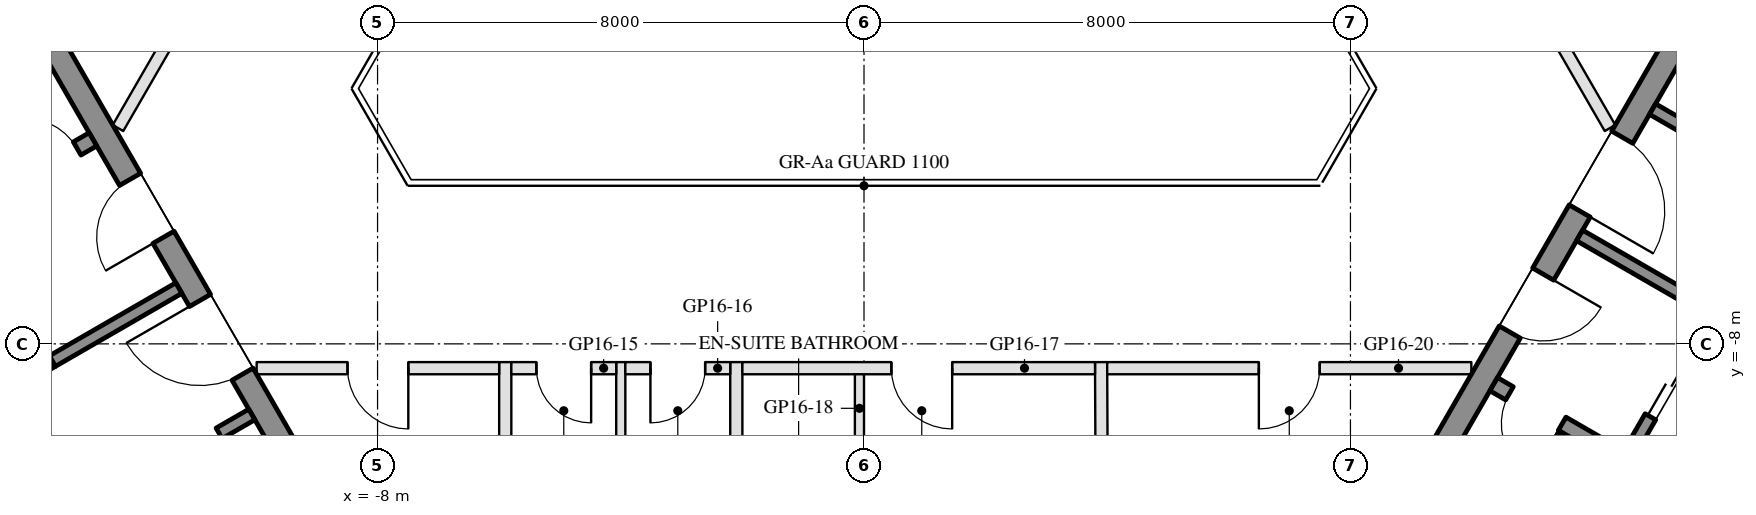
"""IFC4 building model, lengths in metres.
Left out: names, types, materials, properties, quantities, classifications, styles, units other than length and angle.
Written with IfcOpenShell. Run it as: python <this file> out.ifc"""

import sys

from ifc_helpers import new_model, si_unit, direction, frame, frame_2d, origin, place, context, subcontext, project, spatial, rectangle, extrude, element, fill, save


model = new_model("IFC4")
c1 = context("Model", 3, precision=1e-05, world=origin(), true_north=direction((0.0, 1.0)))
c2 = subcontext(c1, "Body", "Model", "MODEL_VIEW")
j1 = project(units=[si_unit("LENGTHUNIT", "METRE"), si_unit("PLANEANGLEUNIT", "RADIAN")], contexts=[c1])
p1 = place(None, origin())
s1 = spatial("IfcSite", under=j1, at=p1, CompositionType="ELEMENT")
p2 = place(p1, origin())
s2 = spatial("IfcBuilding", under=s1, at=p2, CompositionType="ELEMENT")
p3 = place(p2, frame((0.0, 0.0, 179.9)))
s3 = spatial("IfcBuildingStorey", under=s2, at=p3, CompositionType="ELEMENT", Elevation=179.9)
p4 = place(p3, frame((-13.845, -2.22, 0.0), z_axis=(0.0, 0.0, 1.0), x_axis=(0.500004234368, -0.866022959057, 0.0)))
e1 = element("IfcWall", 1, at=p4, inside=s3, PredefinedType="SHEAR", context=c2, shape_type="SweptSolid", body=[
    extrude(rectangle(XDim=10.0, YDim=0.4, at=frame_2d((5.0, 0.0))), origin(), (0.0, 0.0, 1.0), 3.5),
])
p5 = place(p4, frame((3.55, 0.0, 0.0)))
e2 = element("IfcOpeningElement", 2, at=p5, cuts=e1, PredefinedType="OPENING", context=c2, shape_type="SweptSolid", body=[
    extrude(rectangle(XDim=1.1, YDim=2.1, at=frame_2d((0.55, 1.05))), frame((0.0, 0.21, 0.0), z_axis=(0.0, -1.0, 0.0), x_axis=(1.0, 0.0, 0.0)), (0.0, 0.0, 1.0), 0.42),
])
p6 = place(p4, frame((5.85, 0.0, 0.0)))
e3 = element("IfcOpeningElement", 3, at=p6, cuts=e1, PredefinedType="OPENING", context=c2, shape_type="SweptSolid", body=[
    extrude(rectangle(XDim=1.4, YDim=2.1, at=frame_2d((0.7, 1.05))), frame((0.0, 0.21, 0.0), z_axis=(0.0, -1.0, 0.0), x_axis=(1.0, 0.0, 0.0)), (0.0, 0.0, 1.0), 0.42),
])
p7 = place(p3, frame((-12.681, -4.636, 0.0), z_axis=(0.0, 0.0, 1.0), x_axis=(-0.866021702275, -0.500006411147, 0.0)))
e4 = element("IfcWall", 4, at=p7, inside=s3, PredefinedType="SHEAR", context=c2, shape_type="SweptSolid", body=[
    extrude(rectangle(XDim=6.45, YDim=0.25, at=frame_2d((3.225, 0.0))), origin(), (0.0, 0.0, 1.0), 3.5),
])
p8 = place(p7, frame((0.3, 0.0, 0.0)))
e5 = element("IfcOpeningElement", 5, at=p8, cuts=e4, PredefinedType="OPENING", context=c2, shape_type="SweptSolid", body=[
    extrude(rectangle(XDim=1.0, YDim=2.1, at=frame_2d((0.5, 1.05))), frame((0.0, 0.135, 0.0), z_axis=(0.0, -1.0, 0.0), x_axis=(1.0, 0.0, 0.0)), (0.0, 0.0, 1.0), 0.27),
])
p9 = place(p3, frame((-14.783, -5.995, 0.0), z_axis=(0.0, 0.0, 1.0), x_axis=(0.49994636267, -0.866056369097, 0.0)))
e6 = element("IfcWall", 6, at=p9, inside=s3, PredefinedType="SHEAR", context=c2, shape_type="SweptSolid", body=[
    extrude(rectangle(XDim=2.8, YDim=0.2, at=frame_2d((1.4, 0.0))), origin(), (0.0, 0.0, 1.0), 3.5),
])
p10 = place(p9, frame((0.7, 0.0, 0.0)))
e7 = element("IfcOpeningElement", 7, at=p10, cuts=e6, PredefinedType="OPENING", context=c2, shape_type="SweptSolid", body=[
    extrude(rectangle(XDim=1.2, YDim=2.1, at=frame_2d((0.6, 1.05))), frame((0.0, 0.11, 0.0), z_axis=(0.0, -1.0, 0.0), x_axis=(1.0, 0.0, 0.0)), (0.0, 0.0, 1.0), 0.22),
])
p11 = place(p3, frame((-11.268, -7.083, 0.0), z_axis=(0.0, 0.0, 1.0), x_axis=(-0.866050077142, -0.499957262057, 0.0)))
e8 = element("IfcWall", 8, at=p11, inside=s3, PredefinedType="SHEAR", context=c2, shape_type="SweptSolid", body=[
    extrude(rectangle(XDim=2.4, YDim=0.2, at=frame_2d((1.2, 0.0))), origin(), (0.0, 0.0, 1.0), 3.5),
])
p12 = place(p3, frame((-10.068, -9.162, 0.0), z_axis=(0.0, 0.0, 1.0), x_axis=(-0.866032725843, -0.499987317609, 0.0)))
e9 = element("IfcWall", 9, at=p12, inside=s3, PredefinedType="SHEAR", context=c2, shape_type="SweptSolid", body=[
    extrude(rectangle(XDim=10.16, YDim=0.2, at=frame_2d((5.08, 0.0))), origin(), (0.0, 0.0, 1.0), 3.5),
])
p13 = place(p12, frame((0.62, 0.0, 0.0)))
e10 = element("IfcOpeningElement", 10, at=p13, cuts=e9, PredefinedType="OPENING", context=c2, shape_type="SweptSolid", body=[
    extrude(rectangle(XDim=1.1, YDim=2.1, at=frame_2d((0.55, 1.05))), frame((0.0, 0.11, 0.0), z_axis=(0.0, -1.0, 0.0), x_axis=(1.0, 0.0, 0.0)), (0.0, 0.0, 1.0), 0.22),
])
p14 = place(p12, frame((3.16, 0.0, 0.0)))
e11 = element("IfcOpeningElement", 11, at=p14, cuts=e9, PredefinedType="OPENING", context=c2, shape_type="SweptSolid", body=[
    extrude(rectangle(XDim=1.1, YDim=2.1, at=frame_2d((0.55, 1.05))), frame((0.0, 0.11, 0.0), z_axis=(0.0, -1.0, 0.0), x_axis=(1.0, 0.0, 0.0)), (0.0, 0.0, 1.0), 0.22),
])
p15 = place(p12, frame((5.7, 0.0, 0.0)))
e12 = element("IfcOpeningElement", 12, at=p15, cuts=e9, PredefinedType="OPENING", context=c2, shape_type="SweptSolid", body=[
    extrude(rectangle(XDim=1.1, YDim=2.1, at=frame_2d((0.55, 1.05))), frame((0.0, 0.11, 0.0), z_axis=(0.0, -1.0, 0.0), x_axis=(1.0, 0.0, 0.0)), (0.0, 0.0, 1.0), 0.22),
])
p16 = place(p12, frame((8.24, 0.0, 0.0)))
e13 = element("IfcOpeningElement", 13, at=p16, cuts=e9, PredefinedType="OPENING", context=c2, shape_type="SweptSolid", body=[
    extrude(rectangle(XDim=1.1, YDim=2.1, at=frame_2d((0.55, 1.05))), frame((0.0, 0.11, 0.0), z_axis=(0.0, -1.0, 0.0), x_axis=(1.0, 0.0, 0.0)), (0.0, 0.0, 1.0), 0.22),
])
p17 = place(p3, frame((8.845, -10.88, 0.0), z_axis=(0.0, 0.0, 1.0), x_axis=(0.500004234368, 0.866022959057, 0.0)))
e14 = element("IfcWall", 14, at=p17, inside=s3, PredefinedType="SHEAR", context=c2, shape_type="SweptSolid", body=[
    extrude(rectangle(XDim=10.0, YDim=0.4, at=frame_2d((5.0, 0.0))), origin(), (0.0, 0.0, 1.0), 3.5),
])
p18 = place(p17, frame((3.55, 0.0, 0.0)))
e15 = element("IfcOpeningElement", 15, at=p18, cuts=e14, PredefinedType="OPENING", context=c2, shape_type="SweptSolid", body=[
    extrude(rectangle(XDim=1.1, YDim=2.1, at=frame_2d((0.55, 1.05))), frame((0.0, 0.21, 0.0), z_axis=(0.0, -1.0, 0.0), x_axis=(1.0, 0.0, 0.0)), (0.0, 0.0, 1.0), 0.42),
])
p19 = place(p17, frame((5.85, 0.0, 0.0)))
e16 = element("IfcOpeningElement", 16, at=p19, cuts=e14, PredefinedType="OPENING", context=c2, shape_type="SweptSolid", body=[
    extrude(rectangle(XDim=1.4, YDim=2.1, at=frame_2d((0.7, 1.05))), frame((0.0, 0.21, 0.0), z_axis=(0.0, -1.0, 0.0), x_axis=(1.0, 0.0, 0.0)), (0.0, 0.0, 1.0), 0.42),
])
p20 = place(p3, frame((10.356, -8.664, 0.0), z_axis=(0.0, 0.0, 1.0), x_axis=(0.866028629588, -0.499994412703, 0.0)))
e17 = element("IfcWall", 17, at=p20, inside=s3, PredefinedType="SHEAR", context=c2, shape_type="SweptSolid", body=[
    extrude(rectangle(XDim=6.45, YDim=0.25, at=frame_2d((3.225, 0.0))), origin(), (0.0, 0.0, 1.0), 3.5),
])
p21 = place(p20, frame((0.3, 0.0, 0.0)))
e18 = element("IfcOpeningElement", 18, at=p21, cuts=e17, PredefinedType="OPENING", context=c2, shape_type="SweptSolid", body=[
    extrude(rectangle(XDim=1.0, YDim=2.1, at=frame_2d((0.5, 1.05))), frame((0.0, 0.135, 0.0), z_axis=(0.0, -1.0, 0.0), x_axis=(1.0, 0.0, 0.0)), (0.0, 0.0, 1.0), 0.27),
])
p22 = place(p3, frame((12.583, -9.805, 0.0), z_axis=(0.0, 0.0, 1.0), x_axis=(0.49994636267, 0.866056369097, 0.0)))
e19 = element("IfcWall", 19, at=p22, inside=s3, PredefinedType="SHEAR", context=c2, shape_type="SweptSolid", body=[
    extrude(rectangle(XDim=2.8, YDim=0.2, at=frame_2d((1.4, 0.0))), origin(), (0.0, 0.0, 1.0), 3.5),
])
p23 = place(p22, frame((0.7, 0.0, 0.0)))
e20 = element("IfcOpeningElement", 20, at=p23, cuts=e19, PredefinedType="OPENING", context=c2, shape_type="SweptSolid", body=[
    extrude(rectangle(XDim=1.2, YDim=2.1, at=frame_2d((0.6, 1.05))), frame((0.0, 0.11, 0.0), z_axis=(0.0, -1.0, 0.0), x_axis=(1.0, 0.0, 0.0)), (0.0, 0.0, 1.0), 0.22),
])
p24 = place(p3, frame((11.768, -6.217, 0.0), z_axis=(0.0, 0.0, 1.0), x_axis=(0.866050077142, -0.499957262057, 0.0)))
e21 = element("IfcWall", 21, at=p24, inside=s3, PredefinedType="SHEAR", context=c2, shape_type="SweptSolid", body=[
    extrude(rectangle(XDim=2.4, YDim=0.2, at=frame_2d((1.2, 0.0))), origin(), (0.0, 0.0, 1.0), 3.5),
])
p25 = place(p3, frame((12.968, -4.138, 0.0), z_axis=(0.0, 0.0, 1.0), x_axis=(0.866028328073, -0.49999493495, 0.0)))
e22 = element("IfcWall", 22, at=p25, inside=s3, PredefinedType="SHEAR", context=c2, shape_type="SweptSolid", body=[
    extrude(rectangle(XDim=10.16, YDim=0.2, at=frame_2d((5.08, 0.0))), origin(), (0.0, 0.0, 1.0), 3.5),
])
p26 = place(p25, frame((0.72, 0.0, 0.0)))
e23 = element("IfcOpeningElement", 23, at=p26, cuts=e22, PredefinedType="OPENING", context=c2, shape_type="SweptSolid", body=[
    extrude(rectangle(XDim=0.9, YDim=2.1, at=frame_2d((0.45, 1.05))), frame((0.0, 0.11, 0.0), z_axis=(0.0, -1.0, 0.0), x_axis=(1.0, 0.0, 0.0)), (0.0, 0.0, 1.0), 0.22),
])
p27 = place(p25, frame((5.8, 0.0, 0.0)))
e24 = element("IfcOpeningElement", 24, at=p27, cuts=e22, PredefinedType="OPENING", context=c2, shape_type="SweptSolid", body=[
    extrude(rectangle(XDim=0.9, YDim=2.1, at=frame_2d((0.45, 1.05))), frame((0.0, 0.11, 0.0), z_axis=(0.0, -1.0, 0.0), x_axis=(1.0, 0.0, 0.0)), (0.0, 0.0, 1.0), 0.22),
])
for number, where, z_axis, x_axis in (
    (25, (-5.9, -18.38, 0.0), (0.0, 0.0, 1.0), (0.0, 1.0, 0.0)),
    (26, (-2.1, -18.38, 0.0), (0.0, 0.0, 1.0), (0.0, 1.0, 0.0)),
):
    element("IfcWall", number, at=place(p3, frame(where, z_axis=z_axis, x_axis=x_axis)), inside=s3, PredefinedType="PARTITIONING", context=c2, shape_type="SweptSolid", body=[
        extrude(rectangle(XDim=10.08, YDim=0.2, at=frame_2d((5.04, 0.0))), origin(), (0.0, 0.0, 1.0), 3.06),
    ])
p28 = place(p3, frame((3.95, -19.28, 0.0), z_axis=(0.0, 0.0, 1.0), x_axis=(-0.004624844922, 0.999989305348, 0.0)))
e27 = element("IfcWall", 27, at=p28, inside=s3, PredefinedType="PARTITIONING", context=c2, shape_type="SweptSolid", body=[
    extrude(rectangle(XDim=10.98, YDim=0.2, at=frame_2d((5.49, 0.0))), origin(), (0.0, 0.0, 1.0), 2.95),
])
p29 = place(p3, frame((-6.0, -8.4, 0.0), z_axis=(0.0, 0.0, 1.0), x_axis=(-1.0, 0.0, 0.0)))
e28 = element("IfcWall", 28, at=p29, inside=s3, PredefinedType="PARTITIONING", context=c2, shape_type="SweptSolid", body=[
    extrude(rectangle(XDim=3.988, YDim=0.2, at=frame_2d((1.994, 0.0))), origin(), (0.0, 0.0, 1.0), 2.95),
])
p30 = place(p29, frame((1.494, 0.0, 0.0)))
e29 = element("IfcOpeningElement", 29, at=p30, cuts=e28, PredefinedType="OPENING", context=c2, shape_type="SweptSolid", body=[
    extrude(rectangle(XDim=1.0, YDim=2.1, at=frame_2d((0.5, 1.05))), frame((0.0, 0.11, 0.0), z_axis=(0.0, -1.0, 0.0), x_axis=(1.0, 0.0, 0.0)), (0.0, 0.0, 1.0), 0.22),
])
p31 = place(p3, frame((-4.0, -18.38, 0.0), z_axis=(0.0, 0.0, 1.0), x_axis=(0.0, 1.0, 0.0)))
e30 = element("IfcWall", 30, at=p31, inside=s3, PredefinedType="PARTITIONING", context=c2, shape_type="SweptSolid", body=[
    extrude(rectangle(XDim=10.08, YDim=0.15, at=frame_2d((5.04, 0.0))), origin(), (0.0, 0.0, 1.0), 2.95),
])
p32 = place(p3, frame((-4.075, -8.4, 0.0), z_axis=(0.0, 0.0, 1.0), x_axis=(-1.0, 0.0, 0.0)))
e31 = element("IfcWall", 31, at=p32, inside=s3, PredefinedType="PARTITIONING", context=c2, shape_type="SweptSolid", body=[
    extrude(rectangle(XDim=1.725, YDim=0.2, at=frame_2d((0.863, 0.0))), origin(), (0.0, 0.0, 1.0), 3.55),
])
p33 = place(p32, frame((0.413, 0.0, 0.0)))
e32 = element("IfcOpeningElement", 32, at=p33, cuts=e31, PredefinedType="OPENING", context=c2, shape_type="SweptSolid", body=[
    extrude(rectangle(XDim=0.9, YDim=2.1, at=frame_2d((0.45, 1.05))), frame((0.0, 0.11, 0.0), z_axis=(0.0, -1.0, 0.0), x_axis=(1.0, 0.0, 0.0)), (0.0, 0.0, 1.0), 0.22),
])
p34 = place(p3, frame((-2.2, -8.4, 0.0), z_axis=(0.0, 0.0, 1.0), x_axis=(-1.0, 0.0, 0.0)))
e33 = element("IfcWall", 33, at=p34, inside=s3, PredefinedType="PARTITIONING", context=c2, shape_type="SweptSolid", body=[
    extrude(rectangle(XDim=1.725, YDim=0.2, at=frame_2d((0.863, 0.0))), origin(), (0.0, 0.0, 1.0), 2.95),
])
p35 = place(p34, frame((0.413, 0.0, 0.0)))
e34 = element("IfcOpeningElement", 34, at=p35, cuts=e33, PredefinedType="OPENING", context=c2, shape_type="SweptSolid", body=[
    extrude(rectangle(XDim=0.9, YDim=2.1, at=frame_2d((0.45, 1.05))), frame((0.0, 0.11, 0.0), z_axis=(0.0, -1.0, 0.0), x_axis=(1.0, 0.0, 0.0)), (0.0, 0.0, 1.0), 0.22),
])
p36 = place(p3, frame((3.8, -8.4, 0.0), z_axis=(0.0, 0.0, 1.0), x_axis=(-1.0, 0.0, 0.0)))
e35 = element("IfcWall", 35, at=p36, inside=s3, PredefinedType="PARTITIONING", context=c2, shape_type="SweptSolid", body=[
    extrude(rectangle(XDim=5.8, YDim=0.2, at=frame_2d((2.9, 0.0))), origin(), (0.0, 0.0, 1.0), 2.95),
])
p37 = place(p36, frame((2.35, 0.0, 0.0)))
e36 = element("IfcOpeningElement", 36, at=p37, cuts=e35, PredefinedType="OPENING", context=c2, shape_type="SweptSolid", body=[
    extrude(rectangle(XDim=1.0, YDim=2.1, at=frame_2d((0.5, 1.05))), frame((0.0, 0.11, 0.0), z_axis=(0.0, -1.0, 0.0), x_axis=(1.0, 0.0, 0.0)), (0.0, 0.0, 1.0), 0.22),
])
p38 = place(p3, frame((-0.075, -11.3, 0.0), z_axis=(0.0, 0.0, 1.0), x_axis=(0.0, 1.0, 0.0)))
e37 = element("IfcWall", 37, at=p38, inside=s3, PredefinedType="PARTITIONING", context=c2, shape_type="SweptSolid", body=[
    extrude(rectangle(XDim=2.8, YDim=0.15, at=frame_2d((1.4, 0.0))), origin(), (0.0, 0.0, 1.0), 2.95),
])
p39 = place(p38, frame((0.5, 0.0, 0.0)))
e38 = element("IfcOpeningElement", 38, at=p39, cuts=e37, PredefinedType="OPENING", context=c2, shape_type="SweptSolid", body=[
    extrude(rectangle(XDim=0.9, YDim=2.1, at=frame_2d((0.45, 1.05))), frame((0.0, 0.085, 0.0), z_axis=(0.0, -1.0, 0.0), x_axis=(1.0, 0.0, 0.0)), (0.0, 0.0, 1.0), 0.17),
])
p40 = place(p3, frame((9.988, -8.4, 0.0), z_axis=(0.0, 0.0, 1.0), x_axis=(-1.0, 0.0, 0.0)))
e39 = element("IfcWall", 39, at=p40, inside=s3, PredefinedType="PARTITIONING", context=c2, shape_type="SweptSolid", body=[
    extrude(rectangle(XDim=5.989, YDim=0.2, at=frame_2d((2.994, 0.0))), origin(), (0.0, 0.0, 1.0), 2.95),
])
p41 = place(p40, frame((2.494, 0.0, 0.0)))
e40 = element("IfcOpeningElement", 40, at=p41, cuts=e39, PredefinedType="OPENING", context=c2, shape_type="SweptSolid", body=[
    extrude(rectangle(XDim=1.0, YDim=2.1, at=frame_2d((0.5, 1.05))), frame((0.0, 0.11, 0.0), z_axis=(0.0, -1.0, 0.0), x_axis=(1.0, 0.0, 0.0)), (0.0, 0.0, 1.0), 0.22),
])
p42 = place(p3, frame((10.032, -0.576, 0.0), z_axis=(0.0, 0.0, 1.0), x_axis=(0.500042097992, -0.866001097133, 0.0)))
e41 = element("IfcWall", 41, at=p42, inside=s3, PredefinedType="PARTITIONING", context=c2, shape_type="SweptSolid", body=[
    extrude(rectangle(XDim=4.474, YDim=0.2, at=frame_2d((2.237, 0.0))), origin(), (0.0, 0.0, 1.0), 2.95),
])
p43 = place(p42, frame((1.737, 0.0, 0.0)))
e42 = element("IfcOpeningElement", 42, at=p43, cuts=e41, PredefinedType="OPENING", context=c2, shape_type="SweptSolid", body=[
    extrude(rectangle(XDim=1.0, YDim=2.1, at=frame_2d((0.5, 1.05))), frame((0.0, 0.11, 0.0), z_axis=(0.0, -1.0, 0.0), x_axis=(1.0, 0.0, 0.0)), (0.0, 0.0, 1.0), 0.22),
])
p44 = place(p3, frame((-12.269, -4.45, 0.0), z_axis=(0.0, 0.0, 1.0), x_axis=(0.500012125002, 0.866018403298, 0.0)))
e43 = element("IfcWall", 43, at=p44, inside=s3, PredefinedType="PARTITIONING", context=c2, shape_type="SweptSolid", body=[
    extrude(rectangle(XDim=4.888, YDim=0.2, at=frame_2d((2.444, 0.0))), origin(), (0.0, 0.0, 1.0), 2.95),
])
p45 = place(p44, frame((1.944, 0.0, 0.0)))
e44 = element("IfcOpeningElement", 44, at=p45, cuts=e43, PredefinedType="OPENING", context=c2, shape_type="SweptSolid", body=[
    extrude(rectangle(XDim=1.0, YDim=2.1, at=frame_2d((0.5, 1.05))), frame((0.0, 0.11, 0.0), z_axis=(0.0, -1.0, 0.0), x_axis=(1.0, 0.0, 0.0)), (0.0, 0.0, 1.0), 0.22),
])
p46 = place(p13, origin())
e45 = element("IfcDoor", 45, at=p46, inside=s3, OperationType="DOUBLE_DOOR_SLIDING", PredefinedType="DOOR", context=c2, shape_type="SweptSolid", body=[
    extrude(rectangle(XDim=1.1, YDim=2.1, at=frame_2d((0.55, 1.05))), frame((0.0, 0.025, 0.0), z_axis=(0.0, -1.0, 0.0), x_axis=(1.0, 0.0, 0.0)), (0.0, 0.0, 1.0), 0.05),
])
fill(e10, e45)
p47 = place(p5, frame((1.1, 0.0, 0.0), z_axis=(0.0, 0.0, 1.0), x_axis=(-1.0, 0.0, 0.0)))
e46 = element("IfcDoor", 46, at=p47, inside=s3, OperationType="SINGLE_SWING_LEFT", PredefinedType="DOOR", context=c2, shape_type="SweptSolid", body=[
    extrude(rectangle(XDim=1.1, YDim=2.1, at=frame_2d((0.55, 1.05))), frame((0.0, 0.025, 0.0), z_axis=(0.0, -1.0, 0.0), x_axis=(1.0, 0.0, 0.0)), (0.0, 0.0, 1.0), 0.05),
])
fill(e2, e46)
p48 = place(p6, frame((1.4, 0.0, 0.0), z_axis=(0.0, 0.0, 1.0), x_axis=(-1.0, 0.0, 0.0)))
e47 = element("IfcDoor", 47, at=p48, inside=s3, OperationType="DOUBLE_DOOR_SINGLE_SWING", PredefinedType="DOOR", context=c2, shape_type="SweptSolid", body=[
    extrude(rectangle(XDim=1.4, YDim=2.1, at=frame_2d((0.7, 1.05))), frame((0.0, 0.025, 0.0), z_axis=(0.0, -1.0, 0.0), x_axis=(1.0, 0.0, 0.0)), (0.0, 0.0, 1.0), 0.05),
])
fill(e3, e47)
p49 = place(p8, frame((1.0, 0.0, 0.0), z_axis=(0.0, 0.0, 1.0), x_axis=(-1.0, 0.0, 0.0)))
e48 = element("IfcDoor", 48, at=p49, inside=s3, OperationType="SINGLE_SWING_LEFT", PredefinedType="DOOR", context=c2, shape_type="SweptSolid", body=[
    extrude(rectangle(XDim=1.0, YDim=2.1, at=frame_2d((0.5, 1.05))), frame((0.0, 0.025, 0.0), z_axis=(0.0, -1.0, 0.0), x_axis=(1.0, 0.0, 0.0)), (0.0, 0.0, 1.0), 0.05),
])
fill(e5, e48)
p50 = place(p23, origin())
e49 = element("IfcDoor", 49, at=p50, inside=s3, OperationType="DOUBLE_DOOR_SLIDING", PredefinedType="DOOR", context=c2, shape_type="SweptSolid", body=[
    extrude(rectangle(XDim=1.2, YDim=2.1, at=frame_2d((0.6, 1.05))), frame((0.0, 0.025, 0.0), z_axis=(0.0, -1.0, 0.0), x_axis=(1.0, 0.0, 0.0)), (0.0, 0.0, 1.0), 0.05),
])
fill(e20, e49)
p51 = place(p18, frame((1.1, 0.0, 0.0), z_axis=(0.0, 0.0, 1.0), x_axis=(-1.0, 0.0, 0.0)))
e50 = element("IfcDoor", 50, at=p51, inside=s3, OperationType="SINGLE_SWING_LEFT", PredefinedType="DOOR", context=c2, shape_type="SweptSolid", body=[
    extrude(rectangle(XDim=1.1, YDim=2.1, at=frame_2d((0.55, 1.05))), frame((0.0, 0.025, 0.0), z_axis=(0.0, -1.0, 0.0), x_axis=(1.0, 0.0, 0.0)), (0.0, 0.0, 1.0), 0.05),
])
fill(e15, e50)
p52 = place(p19, frame((1.4, 0.0, 0.0), z_axis=(0.0, 0.0, 1.0), x_axis=(-1.0, 0.0, 0.0)))
e51 = element("IfcDoor", 51, at=p52, inside=s3, OperationType="DOUBLE_DOOR_SINGLE_SWING", PredefinedType="DOOR", context=c2, shape_type="SweptSolid", body=[
    extrude(rectangle(XDim=1.4, YDim=2.1, at=frame_2d((0.7, 1.05))), frame((0.0, 0.025, 0.0), z_axis=(0.0, -1.0, 0.0), x_axis=(1.0, 0.0, 0.0)), (0.0, 0.0, 1.0), 0.05),
])
fill(e16, e51)
p53 = place(p21, frame((1.0, 0.0, 0.0), z_axis=(0.0, 0.0, 1.0), x_axis=(-1.0, 0.0, 0.0)))
e52 = element("IfcDoor", 52, at=p53, inside=s3, OperationType="SINGLE_SWING_LEFT", PredefinedType="DOOR", context=c2, shape_type="SweptSolid", body=[
    extrude(rectangle(XDim=1.0, YDim=2.1, at=frame_2d((0.5, 1.05))), frame((0.0, 0.025, 0.0), z_axis=(0.0, -1.0, 0.0), x_axis=(1.0, 0.0, 0.0)), (0.0, 0.0, 1.0), 0.05),
])
fill(e18, e52)
p54 = place(p30, origin())
e53 = element("IfcDoor", 53, at=p54, inside=s3, OperationType="SINGLE_SWING_LEFT", PredefinedType="DOOR", context=c2, shape_type="SweptSolid", body=[
    extrude(rectangle(XDim=1.0, YDim=2.1, at=frame_2d((0.5, 1.05))), frame((0.0, 0.025, 0.0), z_axis=(0.0, -1.0, 0.0), x_axis=(1.0, 0.0, 0.0)), (0.0, 0.0, 1.0), 0.05),
])
fill(e29, e53)
p55 = place(p33, origin())
e54 = element("IfcDoor", 54, at=p55, inside=s3, OperationType="SINGLE_SWING_LEFT", PredefinedType="DOOR", context=c2, shape_type="SweptSolid", body=[
    extrude(rectangle(XDim=0.9, YDim=2.1, at=frame_2d((0.45, 1.05))), frame((0.0, 0.025, 0.0), z_axis=(0.0, -1.0, 0.0), x_axis=(1.0, 0.0, 0.0)), (0.0, 0.0, 1.0), 0.05),
])
fill(e32, e54)
p56 = place(p35, origin())
e55 = element("IfcDoor", 55, at=p56, inside=s3, OperationType="SINGLE_SWING_RIGHT", PredefinedType="DOOR", context=c2, shape_type="SweptSolid", body=[
    extrude(rectangle(XDim=0.9, YDim=2.1, at=frame_2d((0.45, 1.05))), frame((0.0, 0.025, 0.0), z_axis=(0.0, -1.0, 0.0), x_axis=(1.0, 0.0, 0.0)), (0.0, 0.0, 1.0), 0.05),
])
fill(e34, e55)
p57 = place(p37, origin())
e56 = element("IfcDoor", 56, at=p57, inside=s3, OperationType="SINGLE_SWING_LEFT", PredefinedType="DOOR", context=c2, shape_type="SweptSolid", body=[
    extrude(rectangle(XDim=1.0, YDim=2.1, at=frame_2d((0.5, 1.05))), frame((0.0, 0.025, 0.0), z_axis=(0.0, -1.0, 0.0), x_axis=(1.0, 0.0, 0.0)), (0.0, 0.0, 1.0), 0.05),
])
fill(e36, e56)
p58 = place(p41, origin())
e57 = element("IfcDoor", 57, at=p58, inside=s3, OperationType="SINGLE_SWING_RIGHT", PredefinedType="DOOR", context=c2, shape_type="SweptSolid", body=[
    extrude(rectangle(XDim=1.0, YDim=2.1, at=frame_2d((0.5, 1.05))), frame((0.0, 0.025, 0.0), z_axis=(0.0, -1.0, 0.0), x_axis=(1.0, 0.0, 0.0)), (0.0, 0.0, 1.0), 0.05),
])
fill(e40, e57)
save(model, sys.argv[1])
